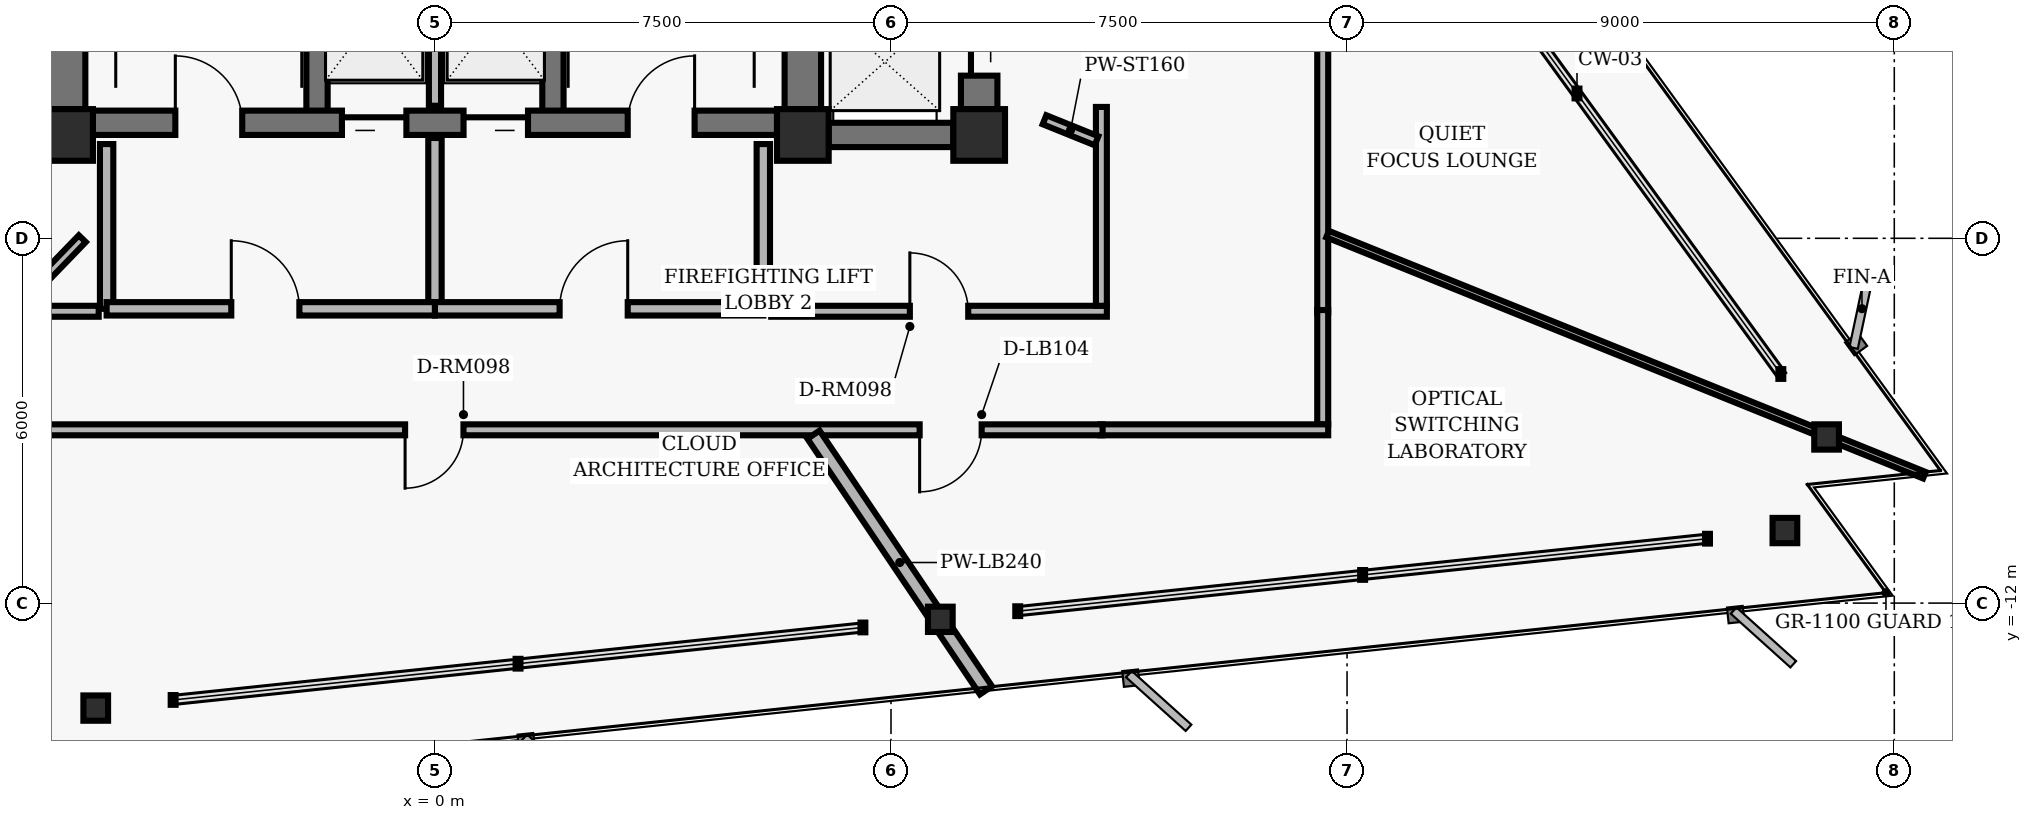
"""IFC4 building model, lengths in metres.
Left out: names, types, materials, properties, quantities, classifications, styles, units other than length and angle.
Written with IfcOpenShell. Run it as: python <this file> out.ifc"""

import sys

from ifc_helpers import new_model, si_unit, direction, frame, frame_2d, origin, origin_2d, place, context, subcontext, project, spatial, rectangle, hollow_rectangle, i_section, extrude, element, fill, save


model = new_model("IFC4")
c1 = context("Model", 3, precision=1e-05, world=origin(), true_north=direction((0.0, 1.0)))
c2 = subcontext(c1, "Body", "Model", "MODEL_VIEW")
j1 = project(units=[si_unit("LENGTHUNIT", "METRE"), si_unit("PLANEANGLEUNIT", "RADIAN")], contexts=[c1])
p1 = place(None, origin())
s1 = spatial("IfcSite", under=j1, at=p1, CompositionType="ELEMENT")
p2 = place(p1, origin())
s2 = spatial("IfcBuilding", under=s1, at=p2, CompositionType="ELEMENT")
p3 = place(p2, frame((0.0, 0.0, 119.84)))
s3 = spatial("IfcBuildingStorey", under=s2, at=p3, CompositionType="ELEMENT", Elevation=119.84)
for number, where, z_axis, x_axis in (
    (1, (-6.05, -4.3, 0.0), (0.0, 0.0, 1.0), (1.0, 0.0, 0.0)),
    (2, (6.05, -4.3, 0.0), (0.0, 0.0, 1.0), (1.0, 0.0, 0.0)),
    (3, (8.95, -4.3, 0.0), (0.0, 0.0, 1.0), (1.0, 0.0, 0.0)),
):
    element("IfcColumn", number, at=place(p3, frame(where, z_axis=z_axis, x_axis=x_axis)), inside=s3, PredefinedType="COLUMN", context=c2, shape_type="SweptSolid", body=[
        extrude(hollow_rectangle(XDim=0.85, YDim=0.85, WallThickness=0.055, InnerFilletRadius=0.02, OuterFilletRadius=0.04, at=origin_2d()), origin(), (0.0, 0.0, 1.0), 3.04),
    ])
for number, where, z_axis, x_axis in (
    (4, (-6.05, -3.875, 0.0), (0.0, 0.0, 1.0), (0.0, 1.0, 0.0)),
    (5, (6.05, -3.875, 0.0), (0.0, 0.0, 1.0), (0.0, 1.0, 0.0)),
):
    element("IfcWall", number, at=place(p3, frame(where, z_axis=z_axis, x_axis=x_axis)), inside=s3, PredefinedType="SHEAR", context=c2, shape_type="SweptSolid", body=[
        extrude(rectangle(XDim=3.45, YDim=0.6, at=frame_2d((1.725, 0.0))), origin(), (0.0, 0.0, 1.0), 2.788),
    ])
for number, where, z_axis, x_axis in (
    (6, (-1.94, -4.1, 0.0), (0.0, 0.0, 1.0), (0.0, 1.0, 0.0)),
    (7, (1.94, -4.1, 0.0), (0.0, 0.0, 1.0), (0.0, 1.0, 0.0)),
):
    element("IfcWall", number, at=place(p3, frame(where, z_axis=z_axis, x_axis=x_axis)), inside=s3, PredefinedType="SHEAR", context=c2, shape_type="SweptSolid", body=[
        extrude(rectangle(XDim=8.2, YDim=0.35, at=frame_2d((4.1, 0.0))), origin(), (0.0, 0.0, 1.0), 2.788),
    ])
p4 = place(p3, frame((-5.625, -4.1, 0.0), z_axis=(0.0, 0.0, 1.0), x_axis=(1.0, 0.0, 0.0)))
e8 = element("IfcWall", 8, at=p4, inside=s3, PredefinedType="SHEAR", context=c2, shape_type="SweptSolid", body=[
    extrude(rectangle(XDim=11.25, YDim=0.4, at=frame_2d((5.625, 0.0))), origin(), (0.0, 0.0, 1.0), 2.788),
])
p5 = place(p4, frame((1.355, 0.0, 0.0)))
e9 = element("IfcOpeningElement", 9, at=p5, cuts=e8, PredefinedType="OPENING", context=c2, shape_type="SweptSolid", body=[
    extrude(rectangle(XDim=1.1, YDim=2.04, at=frame_2d((0.55, 1.02))), frame((0.0, 0.21, 0.0), z_axis=(0.0, -1.0, 0.0), x_axis=(1.0, 0.0, 0.0)), (0.0, 0.0, 1.0), 0.42),
])
p6 = place(p4, frame((8.795, 0.0, 0.0)))
e10 = element("IfcOpeningElement", 10, at=p6, cuts=e8, PredefinedType="OPENING", context=c2, shape_type="SweptSolid", body=[
    extrude(rectangle(XDim=1.1, YDim=2.04, at=frame_2d((0.55, 1.02))), frame((0.0, 0.21, 0.0), z_axis=(0.0, -1.0, 0.0), x_axis=(1.0, 0.0, 0.0)), (0.0, 0.0, 1.0), 0.42),
])
p7 = place(p4, frame((4.095, 0.0, 0.0)))
e11 = element("IfcOpeningElement", 11, at=p7, cuts=e8, PredefinedType="OPENING", context=c2, shape_type="SweptSolid", body=[
    extrude(rectangle(XDim=1.06, YDim=2.04, at=frame_2d((0.53, 1.02))), frame((0.0, 0.21, 0.0), z_axis=(0.0, -1.0, 0.0), x_axis=(1.0, 0.0, 0.0)), (0.0, 0.0, 1.0), 0.42),
])
p8 = place(p4, frame((6.095, 0.0, 0.0)))
e12 = element("IfcOpeningElement", 12, at=p8, cuts=e8, PredefinedType="OPENING", context=c2, shape_type="SweptSolid", body=[
    extrude(rectangle(XDim=1.06, YDim=2.04, at=frame_2d((0.53, 1.02))), frame((0.0, 0.21, 0.0), z_axis=(0.0, -1.0, 0.0), x_axis=(1.0, 0.0, 0.0)), (0.0, 0.0, 1.0), 0.42),
])
p9 = place(p3, frame((8.95, -3.875, 0.0), z_axis=(0.0, 0.0, 1.0), x_axis=(0.0, 1.0, 0.0)))
e13 = element("IfcWall", 13, at=p9, inside=s3, PredefinedType="SHEAR", context=c2, shape_type="SweptSolid", body=[
    extrude(rectangle(XDim=7.95, YDim=0.6, at=frame_2d((3.975, 0.0))), origin(), (0.0, 0.0, 1.0), 2.788),
])
p10 = place(p9, frame((0.55, 0.0, 0.0)))
e14 = element("IfcOpeningElement", 14, at=p10, cuts=e13, PredefinedType="OPENING", context=c2, shape_type="SweptSolid", body=[
    extrude(rectangle(XDim=1.06, YDim=2.04, at=frame_2d((0.53, 1.02))), frame((0.0, 0.31, 0.0), z_axis=(0.0, -1.0, 0.0), x_axis=(1.0, 0.0, 0.0)), (0.0, 0.0, 1.0), 0.62),
])
p11 = place(p9, frame((3.445, 0.0, 0.0)))
e15 = element("IfcOpeningElement", 15, at=p11, cuts=e13, PredefinedType="OPENING", context=c2, shape_type="SweptSolid", body=[
    extrude(rectangle(XDim=1.06, YDim=2.04, at=frame_2d((0.53, 1.02))), frame((0.0, 0.31, 0.0), z_axis=(0.0, -1.0, 0.0), x_axis=(1.0, 0.0, 0.0)), (0.0, 0.0, 1.0), 0.62),
])
p12 = place(p9, frame((6.33, 0.0, 0.0)))
e16 = element("IfcOpeningElement", 16, at=p12, cuts=e13, PredefinedType="OPENING", context=c2, shape_type="SweptSolid", body=[
    extrude(rectangle(XDim=1.06, YDim=2.04, at=frame_2d((0.53, 1.02))), frame((0.0, 0.31, 0.0), z_axis=(0.0, -1.0, 0.0), x_axis=(1.0, 0.0, 0.0)), (0.0, 0.0, 1.0), 0.62),
])
p13 = place(p3, frame((6.475, -4.3, 0.0), z_axis=(0.0, 0.0, 1.0), x_axis=(1.0, 0.0, 0.0)))
e17 = element("IfcWall", 17, at=p13, inside=s3, PredefinedType="SHEAR", context=c2, shape_type="SweptSolid", body=[
    extrude(rectangle(XDim=2.05, YDim=0.4, at=frame_2d((1.025, 0.0))), origin(), (0.0, 0.0, 1.0), 2.788),
])
for number, where, z_axis, x_axis in (
    (18, (22.887, -9.268, 0.0), (0.0, 0.0, 1.0), (1.0, 0.0, 0.0)),
    (19, (-5.579, -13.727, 0.0), (0.0, 0.0, 1.0), (1.0, 0.0, 0.0)),
    (20, (8.311, -12.267, 0.0), (0.0, 0.0, 1.0), (1.0, 0.0, 0.0)),
    (21, (22.201, -10.807, 0.0), (0.0, 0.0, 1.0), (1.0, 0.0, 0.0)),
):
    element("IfcColumn", number, at=place(p3, frame(where, z_axis=z_axis, x_axis=x_axis)), inside=s3, PredefinedType="COLUMN", context=c2, shape_type="SweptSolid", body=[
        extrude(i_section(OverallWidth=0.406, OverallDepth=0.416, WebThickness=0.03, FlangeThickness=0.048, FilletRadius=0.02, at=origin_2d()), origin(), (0.0, 0.0, 1.0), 3.04),
    ])
p14 = place(p3, frame((0.0, -3.82, 0.0), z_axis=(0.0, 0.0, 1.0), x_axis=(0.0, 1.0, 0.0)))
e22 = element("IfcWall", 22, at=p14, inside=s3, PredefinedType="PARTITIONING", context=c2, shape_type="SweptSolid", body=[
    extrude(rectangle(XDim=2.67, YDim=0.2, at=frame_2d((1.335, 0.0))), origin(), (0.0, 0.0, 1.0), 2.763),
])
for number, where, z_axis, x_axis in (
    (23, (-5.4, -7.16, 0.0), (0.0, 0.0, 1.0), (0.0, 1.0, 0.0)),
    (24, (5.4, -7.16, 0.0), (0.0, 0.0, 1.0), (0.0, 1.0, 0.0)),
):
    element("IfcWall", number, at=place(p3, frame(where, z_axis=z_axis, x_axis=x_axis)), inside=s3, PredefinedType="PARTITIONING", context=c2, shape_type="SweptSolid", body=[
        extrude(rectangle(XDim=2.71, YDim=0.22, at=frame_2d((1.355, 0.0))), origin(), (0.0, 0.0, 1.0), 2.763),
    ])
p15 = place(p3, frame((0.0, -7.16, 0.0), z_axis=(0.0, 0.0, 1.0), x_axis=(0.0, 1.0, 0.0)))
e25 = element("IfcWall", 25, at=p15, inside=s3, PredefinedType="PARTITIONING", context=c2, shape_type="SweptSolid", body=[
    extrude(rectangle(XDim=2.81, YDim=0.22, at=frame_2d((1.405, 0.0))), origin(), (0.0, 0.0, 1.0), 2.763),
])
p16 = place(p3, frame((-5.4, -7.16, 0.0), z_axis=(0.0, 0.0, 1.0), x_axis=(1.0, 0.0, 0.0)))
e26 = element("IfcWall", 26, at=p16, inside=s3, PredefinedType="PARTITIONING", context=c2, shape_type="SweptSolid", body=[
    extrude(rectangle(XDim=5.4, YDim=0.22, at=frame_2d((2.7, 0.0))), origin(), (0.0, 0.0, 1.0), 2.33),
])
p17 = place(p16, frame((2.05, 0.0, 0.0)))
e27 = element("IfcOpeningElement", 27, at=p17, cuts=e26, PredefinedType="OPENING", context=c2, shape_type="SweptSolid", body=[
    extrude(rectangle(XDim=1.12, YDim=2.02, at=frame_2d((0.56, 1.01))), frame((0.0, 0.12, 0.0), z_axis=(0.0, -1.0, 0.0), x_axis=(1.0, 0.0, 0.0)), (0.0, 0.0, 1.0), 0.24),
])
p18 = place(p3, frame((0.0, -7.16, 0.0), z_axis=(0.0, 0.0, 1.0), x_axis=(1.0, 0.0, 0.0)))
e28 = element("IfcWall", 28, at=p18, inside=s3, PredefinedType="PARTITIONING", context=c2, shape_type="SweptSolid", body=[
    extrude(rectangle(XDim=5.4, YDim=0.22, at=frame_2d((2.7, 0.0))), origin(), (0.0, 0.0, 1.0), 2.33),
])
p19 = place(p18, frame((2.05, 0.0, 0.0)))
e29 = element("IfcOpeningElement", 29, at=p19, cuts=e28, PredefinedType="OPENING", context=c2, shape_type="SweptSolid", body=[
    extrude(rectangle(XDim=1.12, YDim=2.02, at=frame_2d((0.56, 1.01))), frame((0.0, 0.12, 0.0), z_axis=(0.0, -1.0, 0.0), x_axis=(1.0, 0.0, 0.0)), (0.0, 0.0, 1.0), 0.24),
])
p20 = place(p3, frame((14.6, 3.018, 0.0), z_axis=(0.0, 0.0, 1.0), x_axis=(0.0, -1.0, 0.0)))
e30 = element("IfcWall", 30, at=p20, inside=s3, PredefinedType="PARTITIONING", context=c2, shape_type="SweptSolid", body=[
    extrude(rectangle(XDim=10.238, YDim=0.18, at=frame_2d((5.119, 0.0))), origin(), (0.0, 0.0, 1.0), 2.763),
])
p21 = place(p20, frame((4.124, 0.0, 0.0)))
e31 = element("IfcOpeningElement", 31, at=p21, cuts=e30, PredefinedType="OPENING", context=c2, shape_type="SweptSolid", body=[
    extrude(rectangle(XDim=0.96, YDim=2.02, at=frame_2d((0.48, 1.01))), frame((0.0, 0.1, 0.0), z_axis=(0.0, -1.0, 0.0), x_axis=(1.0, 0.0, 0.0)), (0.0, 0.0, 1.0), 0.2),
])
p22 = place(p3, frame((14.6, -7.18, 0.0), z_axis=(0.0, 0.0, 1.0), x_axis=(0.0, -1.0, 0.0)))
e32 = element("IfcWall", 32, at=p22, inside=s3, PredefinedType="PARTITIONING", context=c2, shape_type="SweptSolid", body=[
    extrude(rectangle(XDim=1.88, YDim=0.18, at=frame_2d((0.94, 0.0))), origin(), (0.0, 0.0, 1.0), 2.763),
])
p23 = place(p3, frame((14.69, -9.15, 0.0), z_axis=(0.0, 0.0, 1.0), x_axis=(-1.0, 0.0, 0.0)))
e33 = element("IfcWall", 33, at=p23, inside=s3, PredefinedType="PARTITIONING", context=c2, shape_type="SweptSolid", body=[
    extrude(rectangle(XDim=3.75, YDim=0.18, at=frame_2d((1.875, 0.0))), origin(), (0.0, 0.0, 1.0), 2.33),
])
p24 = place(p3, frame((10.98, -9.15, 0.0), z_axis=(0.0, 0.0, 1.0), x_axis=(-1.0, 0.0, 0.0)))
e34 = element("IfcWall", 34, at=p24, inside=s3, PredefinedType="PARTITIONING", context=c2, shape_type="SweptSolid", body=[
    extrude(rectangle(XDim=17.5, YDim=0.18, at=frame_2d((8.75, 0.0))), origin(), (0.0, 0.0, 1.0), 2.33),
])
p25 = place(p24, frame((10.511, 0.0, 0.0)))
e35 = element("IfcOpeningElement", 35, at=p25, cuts=e34, PredefinedType="OPENING", context=c2, shape_type="SweptSolid", body=[
    extrude(rectangle(XDim=0.96, YDim=2.02, at=frame_2d((0.48, 1.01))), frame((0.0, 0.1, 0.0), z_axis=(0.0, -1.0, 0.0), x_axis=(1.0, 0.0, 0.0)), (0.0, 0.0, 1.0), 0.2),
])
p26 = place(p24, frame((1.989, 0.0, 0.0)))
e36 = element("IfcOpeningElement", 36, at=p26, cuts=e34, PredefinedType="OPENING", context=c2, shape_type="SweptSolid", body=[
    extrude(rectangle(XDim=1.02, YDim=2.02, at=frame_2d((0.51, 1.01))), frame((0.0, 0.1, 0.0), z_axis=(0.0, -1.0, 0.0), x_axis=(1.0, 0.0, 0.0)), (0.0, 0.0, 1.0), 0.2),
])
p27 = place(p3, frame((5.53, -7.2, 0.0), z_axis=(0.0, 0.0, 1.0), x_axis=(1.0, 0.0, 0.0)))
e37 = element("IfcWall", 37, at=p27, inside=s3, PredefinedType="PARTITIONING", context=c2, shape_type="SweptSolid", body=[
    extrude(rectangle(XDim=5.52, YDim=0.18, at=frame_2d((2.76, 0.0))), origin(), (0.0, 0.0, 1.0), 2.33),
])
p28 = place(p27, frame((2.28, 0.0, 0.0)))
e38 = element("IfcOpeningElement", 38, at=p28, cuts=e37, PredefinedType="OPENING", context=c2, shape_type="SweptSolid", body=[
    extrude(rectangle(XDim=0.96, YDim=2.02, at=frame_2d((0.48, 1.01))), frame((0.0, 0.1, 0.0), z_axis=(0.0, -1.0, 0.0), x_axis=(1.0, 0.0, 0.0)), (0.0, 0.0, 1.0), 0.2),
])
p29 = place(p3, frame((10.96, -7.11, 0.0), z_axis=(0.0, 0.0, 1.0), x_axis=(0.0, 1.0, 0.0)))
e39 = element("IfcWall", 39, at=p29, inside=s3, PredefinedType="PARTITIONING", context=c2, shape_type="SweptSolid", body=[
    extrude(rectangle(XDim=3.271, YDim=0.18, at=frame_2d((1.635, 0.0))), origin(), (0.0, 0.0, 1.0), 2.763),
])
p30 = place(p3, frame((-6.59, -7.2, 0.0), z_axis=(0.0, 0.0, 1.0), x_axis=(1.0, 0.0, 0.0)))
e40 = element("IfcWall", 40, at=p30, inside=s3, PredefinedType="PARTITIONING", context=c2, shape_type="SweptSolid", body=[
    extrude(rectangle(XDim=1.06, YDim=0.18, at=frame_2d((0.53, 0.0))), origin(), (0.0, 0.0, 1.0), 2.33),
])
p31 = place(p3, frame((-5.8, -6.006, 0.0), z_axis=(0.0, 0.0, 1.0), x_axis=(-0.694550575615, -0.719443881003, 0.0)))
e41 = element("IfcWall", 41, at=p31, inside=s3, PredefinedType="PARTITIONING", context=c2, shape_type="SweptSolid", body=[
    extrude(rectangle(XDim=0.893, YDim=0.16, at=frame_2d((0.446, 0.0))), origin(), (0.0, 0.0, 1.0), 2.763),
])
p32 = place(p3, frame((6.226, -9.23, 0.0), z_axis=(0.0, 0.0, 1.0), x_axis=(0.559190912305, -0.82903891561, 0.0)))
e42 = element("IfcWall", 42, at=p32, inside=s3, PredefinedType="PARTITIONING", context=c2, shape_type="SweptSolid", body=[
    extrude(rectangle(XDim=5.072, YDim=0.24, at=frame_2d((2.536, 0.0))), origin(), (0.0, 0.0, 1.0), 2.763),
])
p33 = place(p3, frame((10.024, -4.05, 0.0), z_axis=(0.0, 0.0, 1.0), x_axis=(0.927194137639, -0.374581140912, 0.0)))
e43 = element("IfcWall", 43, at=p33, inside=s3, PredefinedType="PARTITIONING", context=c2, shape_type="SweptSolid", body=[
    extrude(rectangle(XDim=0.923, YDim=0.16, at=frame_2d((0.461, 0.0))), origin(), (0.0, 0.0, 1.0), 2.763),
])
p34 = place(p3, frame((14.68, -5.931, 0.0), z_axis=(0.0, 0.0, 1.0), x_axis=(0.927187622353, -0.374597267682, 0.0)))
e44 = element("IfcWall", 44, at=p34, inside=s3, PredefinedType="MOVABLE", context=c2, shape_type="SweptSolid", body=[
    extrude(rectangle(XDim=10.586, YDim=0.115, at=frame_2d((5.293, 0.0))), origin(), (0.0, 0.0, 1.0), 2.132),
])
p35 = place(p5, origin())
e45 = element("IfcDoor", 45, at=p35, inside=s3, OperationType="SINGLE_SWING_LEFT", PredefinedType="DOOR", context=c2, shape_type="SweptSolid", body=[
    extrude(rectangle(XDim=1.1, YDim=2.04, at=frame_2d((0.55, 1.02))), frame((0.0, 0.025, 0.0), z_axis=(0.0, -1.0, 0.0), x_axis=(1.0, 0.0, 0.0)), (0.0, 0.0, 1.0), 0.05),
])
fill(e9, e45)
p36 = place(p6, origin())
e46 = element("IfcDoor", 46, at=p36, inside=s3, OperationType="SINGLE_SWING_RIGHT", PredefinedType="DOOR", context=c2, shape_type="SweptSolid", body=[
    extrude(rectangle(XDim=1.1, YDim=2.04, at=frame_2d((0.55, 1.02))), frame((0.0, 0.025, 0.0), z_axis=(0.0, -1.0, 0.0), x_axis=(1.0, 0.0, 0.0)), (0.0, 0.0, 1.0), 0.05),
])
fill(e10, e46)
p37 = place(p7, origin())
e47 = element("IfcDoor", 47, at=p37, inside=s3, OperationType="SLIDING_TO_LEFT", PredefinedType="DOOR", context=c2, shape_type="SweptSolid", body=[
    extrude(rectangle(XDim=1.06, YDim=2.04, at=frame_2d((0.53, 1.02))), frame((0.0, 0.025, 0.0), z_axis=(0.0, -1.0, 0.0), x_axis=(1.0, 0.0, 0.0)), (0.0, 0.0, 1.0), 0.05),
])
fill(e11, e47)
p38 = place(p8, origin())
e48 = element("IfcDoor", 48, at=p38, inside=s3, OperationType="SLIDING_TO_RIGHT", PredefinedType="DOOR", context=c2, shape_type="SweptSolid", body=[
    extrude(rectangle(XDim=1.06, YDim=2.04, at=frame_2d((0.53, 1.02))), frame((0.0, 0.025, 0.0), z_axis=(0.0, -1.0, 0.0), x_axis=(1.0, 0.0, 0.0)), (0.0, 0.0, 1.0), 0.05),
])
fill(e12, e48)
p39 = place(p17, origin())
e49 = element("IfcDoor", 49, at=p39, inside=s3, OperationType="SINGLE_SWING_LEFT", PredefinedType="DOOR", context=c2, shape_type="SweptSolid", body=[
    extrude(rectangle(XDim=1.12, YDim=2.02, at=frame_2d((0.56, 1.01))), frame((0.0, 0.025, 0.0), z_axis=(0.0, -1.0, 0.0), x_axis=(1.0, 0.0, 0.0)), (0.0, 0.0, 1.0), 0.05),
])
fill(e27, e49)
p40 = place(p19, origin())
e50 = element("IfcDoor", 50, at=p40, inside=s3, OperationType="SINGLE_SWING_RIGHT", PredefinedType="DOOR", context=c2, shape_type="SweptSolid", body=[
    extrude(rectangle(XDim=1.12, YDim=2.02, at=frame_2d((0.56, 1.01))), frame((0.0, 0.025, 0.0), z_axis=(0.0, -1.0, 0.0), x_axis=(1.0, 0.0, 0.0)), (0.0, 0.0, 1.0), 0.05),
])
fill(e29, e50)
p41 = place(p10, origin())
e51 = element("IfcDoor", 51, at=p41, inside=s3, OperationType="SLIDING_TO_LEFT", PredefinedType="DOOR", context=c2, shape_type="SweptSolid", body=[
    extrude(rectangle(XDim=1.06, YDim=2.04, at=frame_2d((0.53, 1.02))), frame((0.0, 0.025, 0.0), z_axis=(0.0, -1.0, 0.0), x_axis=(1.0, 0.0, 0.0)), (0.0, 0.0, 1.0), 0.05),
])
fill(e14, e51)
p42 = place(p25, origin())
e52 = element("IfcDoor", 52, at=p42, inside=s3, OperationType="SINGLE_SWING_RIGHT", PredefinedType="DOOR", context=c2, shape_type="SweptSolid", body=[
    extrude(rectangle(XDim=0.96, YDim=2.02, at=frame_2d((0.48, 1.01))), frame((0.0, 0.025, 0.0), z_axis=(0.0, -1.0, 0.0), x_axis=(1.0, 0.0, 0.0)), (0.0, 0.0, 1.0), 0.05),
])
fill(e35, e52)
p43 = place(p28, origin())
e53 = element("IfcDoor", 53, at=p43, inside=s3, OperationType="SINGLE_SWING_LEFT", PredefinedType="DOOR", context=c2, shape_type="SweptSolid", body=[
    extrude(rectangle(XDim=0.96, YDim=2.02, at=frame_2d((0.48, 1.01))), frame((0.0, 0.025, 0.0), z_axis=(0.0, -1.0, 0.0), x_axis=(1.0, 0.0, 0.0)), (0.0, 0.0, 1.0), 0.05),
])
fill(e38, e53)
p44 = place(p26, origin())
e54 = element("IfcDoor", 54, at=p44, inside=s3, OperationType="SINGLE_SWING_RIGHT", PredefinedType="DOOR", context=c2, shape_type="SweptSolid", body=[
    extrude(rectangle(XDim=1.02, YDim=2.02, at=frame_2d((0.51, 1.01))), frame((0.0, 0.025, 0.0), z_axis=(0.0, -1.0, 0.0), x_axis=(1.0, 0.0, 0.0)), (0.0, 0.0, 1.0), 0.05),
])
fill(e36, e54)
save(model, sys.argv[1])
